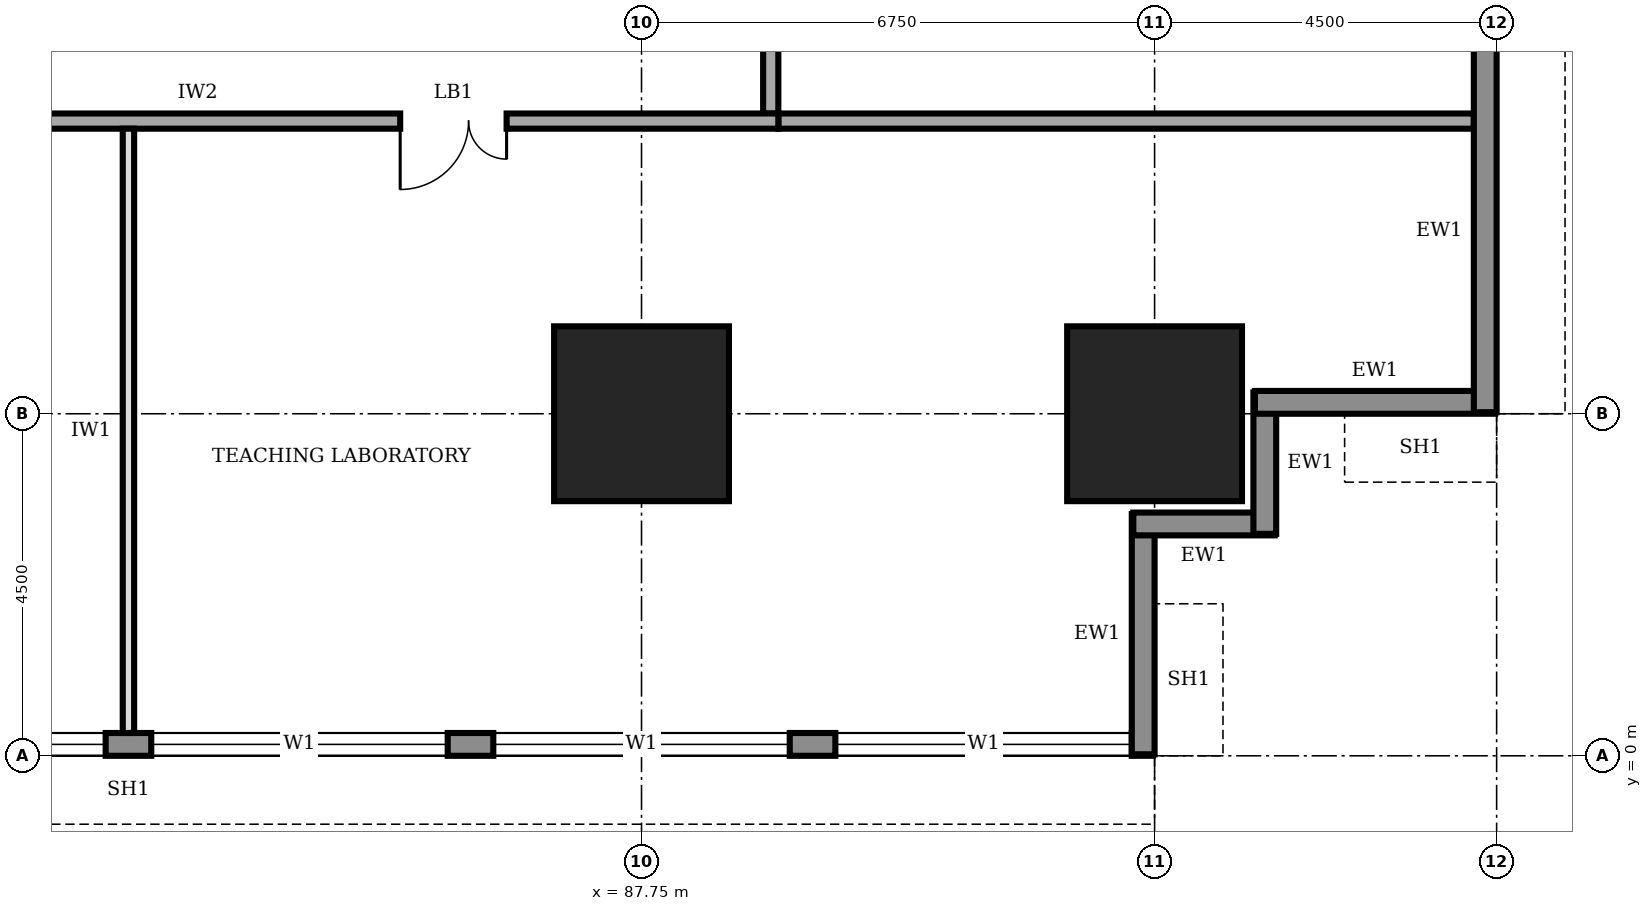
"""IFC4 building model, lengths in metres.
Left out: names, types, materials, properties, quantities, classifications, styles, units other than length and angle.
Written with IfcOpenShell. Run it as: python <this file> out.ifc"""

import sys

from ifc_helpers import new_model, si_unit, direction, frame, frame_2d, origin, origin_2d, place, context, subcontext, project, spatial, rectangle, extrude, element, fill, save


model = new_model("IFC4")
c1 = context("Model", 3, precision=1e-05, world=origin(), true_north=direction((0.0, 1.0)))
c2 = subcontext(c1, "Body", "Model", "MODEL_VIEW")
j1 = project(units=[si_unit("LENGTHUNIT", "METRE"), si_unit("PLANEANGLEUNIT", "RADIAN")], contexts=[c1])
p1 = place(None, origin())
s1 = spatial("IfcSite", under=j1, at=p1, CompositionType="ELEMENT")
p2 = place(p1, origin())
s2 = spatial("IfcBuilding", under=s1, at=p2, CompositionType="ELEMENT")
p3 = place(p2, frame((0.0, 0.0, 41.0)))
s3 = spatial("IfcBuildingStorey", under=s2, at=p3, CompositionType="ELEMENT", Elevation=41.0)
for number, where, z_axis, x_axis in (
    (1, (87.75, 4.5, 0.0), (0.0, 0.0, 1.0), (1.0, 0.0, 0.0)),
    (2, (94.5, 4.5, 0.0), (0.0, 0.0, 1.0), (1.0, 0.0, 0.0)),
):
    element("IfcColumn", number, at=place(p3, frame(where, z_axis=z_axis, x_axis=x_axis)), inside=s3, PredefinedType="COLUMN", context=c2, shape_type="SweptSolid", body=[
        extrude(rectangle(XDim=2.3, YDim=2.3, at=origin_2d()), origin(), (0.0, 0.0, 1.0), 4.0),
    ])
p4 = place(p3, frame((67.52, 0.15, 0.0), z_axis=(0.0, 0.0, 1.0), x_axis=(1.0, 0.0, 0.0)))
e3 = element("IfcWall", 3, at=p4, inside=s3, PredefinedType="STANDARD", context=c2, shape_type="SweptSolid", body=[
    extrude(rectangle(XDim=26.96, YDim=0.3, at=frame_2d((13.48, 0.0))), origin(), (0.0, 0.0, 1.0), 3.75),
])
p5 = place(p4, frame((4.78, 0.0, 0.9)))
e4 = element("IfcOpeningElement", 4, at=p5, cuts=e3, PredefinedType="OPENING", context=c2, shape_type="SweptSolid", body=[
    extrude(rectangle(XDim=3.9, YDim=2.2, at=frame_2d((1.95, 1.1))), frame((0.0, 0.16, 0.0), z_axis=(0.0, -1.0, 0.0), x_axis=(1.0, 0.0, 0.0)), (0.0, 0.0, 1.0), 0.32),
])
p6 = place(p4, frame((9.28, 0.0, 0.9)))
e5 = element("IfcOpeningElement", 5, at=p6, cuts=e3, PredefinedType="OPENING", context=c2, shape_type="SweptSolid", body=[
    extrude(rectangle(XDim=3.9, YDim=2.2, at=frame_2d((1.95, 1.1))), frame((0.0, 0.16, 0.0), z_axis=(0.0, -1.0, 0.0), x_axis=(1.0, 0.0, 0.0)), (0.0, 0.0, 1.0), 0.32),
])
p7 = place(p4, frame((13.78, 0.0, 0.9)))
e6 = element("IfcOpeningElement", 6, at=p7, cuts=e3, PredefinedType="OPENING", context=c2, shape_type="SweptSolid", body=[
    extrude(rectangle(XDim=3.9, YDim=2.2, at=frame_2d((1.95, 1.1))), frame((0.0, 0.16, 0.0), z_axis=(0.0, -1.0, 0.0), x_axis=(1.0, 0.0, 0.0)), (0.0, 0.0, 1.0), 0.32),
])
p8 = place(p4, frame((18.28, 0.0, 0.9)))
e7 = element("IfcOpeningElement", 7, at=p8, cuts=e3, PredefinedType="OPENING", context=c2, shape_type="SweptSolid", body=[
    extrude(rectangle(XDim=3.9, YDim=2.2, at=frame_2d((1.95, 1.1))), frame((0.0, 0.16, 0.0), z_axis=(0.0, -1.0, 0.0), x_axis=(1.0, 0.0, 0.0)), (0.0, 0.0, 1.0), 0.32),
])
p9 = place(p4, frame((22.78, 0.0, 0.9)))
e8 = element("IfcOpeningElement", 8, at=p9, cuts=e3, PredefinedType="OPENING", context=c2, shape_type="SweptSolid", body=[
    extrude(rectangle(XDim=3.9, YDim=2.2, at=frame_2d((1.95, 1.1))), frame((0.0, 0.16, 0.0), z_axis=(0.0, -1.0, 0.0), x_axis=(1.0, 0.0, 0.0)), (0.0, 0.0, 1.0), 0.32),
])
p10 = place(p3, frame((94.35, 0.02, 0.0), z_axis=(0.0, 0.0, 1.0), x_axis=(0.0, 1.0, 0.0)))
e9 = element("IfcWall", 9, at=p10, inside=s3, PredefinedType="STANDARD", context=c2, shape_type="SweptSolid", body=[
    extrude(rectangle(XDim=3.16, YDim=0.3, at=frame_2d((1.58, 0.0))), origin(), (0.0, 0.0, 1.0), 2.85),
])
for number, where, z_axis, x_axis in (
    (10, (94.22, 3.05, 0.0), (0.0, 0.0, 1.0), (1.0, 0.0, 0.0)),
    (11, (95.95, 2.92, 0.0), (0.0, 0.0, 1.0), (0.0, 1.0, 0.0)),
):
    element("IfcWall", number, at=place(p3, frame(where, z_axis=z_axis, x_axis=x_axis)), inside=s3, PredefinedType="STANDARD", context=c2, shape_type="SweptSolid", body=[
        extrude(rectangle(XDim=1.86, YDim=0.3, at=frame_2d((0.93, 0.0))), origin(), (0.0, 0.0, 1.0), 3.75),
    ])
p11 = place(p3, frame((95.82, 4.65, 0.0), z_axis=(0.0, 0.0, 1.0), x_axis=(1.0, 0.0, 0.0)))
e12 = element("IfcWall", 12, at=p11, inside=s3, PredefinedType="STANDARD", context=c2, shape_type="SweptSolid", body=[
    extrude(rectangle(XDim=3.16, YDim=0.3, at=frame_2d((1.58, 0.0))), origin(), (0.0, 0.0, 1.0), 2.85),
])
p12 = place(p3, frame((98.85, 4.52, 0.0), z_axis=(0.0, 0.0, 1.0), x_axis=(0.0, 1.0, 0.0)))
e13 = element("IfcWall", 13, at=p12, inside=s3, PredefinedType="STANDARD", context=c2, shape_type="SweptSolid", body=[
    extrude(rectangle(XDim=31.46, YDim=0.3, at=frame_2d((15.73, 0.0))), origin(), (0.0, 0.0, 1.0), 3.75),
])
p13 = place(p12, frame((4.78, 0.0, 0.9)))
e14 = element("IfcOpeningElement", 14, at=p13, cuts=e13, PredefinedType="OPENING", context=c2, shape_type="SweptSolid", body=[
    extrude(rectangle(XDim=3.9, YDim=2.2, at=frame_2d((1.95, 1.1))), frame((0.0, 0.16, 0.0), z_axis=(0.0, -1.0, 0.0), x_axis=(1.0, 0.0, 0.0)), (0.0, 0.0, 1.0), 0.32),
])
p14 = place(p12, frame((9.28, 0.0, 0.9)))
e15 = element("IfcOpeningElement", 15, at=p14, cuts=e13, PredefinedType="OPENING", context=c2, shape_type="SweptSolid", body=[
    extrude(rectangle(XDim=3.9, YDim=2.2, at=frame_2d((1.95, 1.1))), frame((0.0, 0.16, 0.0), z_axis=(0.0, -1.0, 0.0), x_axis=(1.0, 0.0, 0.0)), (0.0, 0.0, 1.0), 0.32),
])
p15 = place(p12, frame((13.78, 0.0, 0.9)))
e16 = element("IfcOpeningElement", 16, at=p15, cuts=e13, PredefinedType="OPENING", context=c2, shape_type="SweptSolid", body=[
    extrude(rectangle(XDim=3.9, YDim=2.2, at=frame_2d((1.95, 1.1))), frame((0.0, 0.16, 0.0), z_axis=(0.0, -1.0, 0.0), x_axis=(1.0, 0.0, 0.0)), (0.0, 0.0, 1.0), 0.32),
])
p16 = place(p12, frame((18.28, 0.0, 0.9)))
e17 = element("IfcOpeningElement", 17, at=p16, cuts=e13, PredefinedType="OPENING", context=c2, shape_type="SweptSolid", body=[
    extrude(rectangle(XDim=3.9, YDim=2.2, at=frame_2d((1.95, 1.1))), frame((0.0, 0.16, 0.0), z_axis=(0.0, -1.0, 0.0), x_axis=(1.0, 0.0, 0.0)), (0.0, 0.0, 1.0), 0.32),
])
p17 = place(p12, frame((22.78, 0.0, 0.9)))
e18 = element("IfcOpeningElement", 18, at=p17, cuts=e13, PredefinedType="OPENING", context=c2, shape_type="SweptSolid", body=[
    extrude(rectangle(XDim=3.9, YDim=2.2, at=frame_2d((1.95, 1.1))), frame((0.0, 0.16, 0.0), z_axis=(0.0, -1.0, 0.0), x_axis=(1.0, 0.0, 0.0)), (0.0, 0.0, 1.0), 0.32),
])
p18 = place(p12, frame((27.28, 0.0, 0.9)))
e19 = element("IfcOpeningElement", 19, at=p18, cuts=e13, PredefinedType="OPENING", context=c2, shape_type="SweptSolid", body=[
    extrude(rectangle(XDim=3.9, YDim=2.2, at=frame_2d((1.95, 1.1))), frame((0.0, 0.16, 0.0), z_axis=(0.0, -1.0, 0.0), x_axis=(1.0, 0.0, 0.0)), (0.0, 0.0, 1.0), 0.32),
])
p19 = place(p3, frame((72.65, 8.35, 0.0), z_axis=(0.0, 0.0, 1.0), x_axis=(1.0, 0.0, 0.0)))
e20 = element("IfcWall", 20, at=p19, inside=s3, PredefinedType="SOLIDWALL", context=c2, shape_type="SweptSolid", body=[
    extrude(rectangle(XDim=16.9, YDim=0.2, at=frame_2d((8.45, 0.0))), origin(), (0.0, 0.0, 1.0), 3.75),
])
p20 = place(p19, frame((1.325, 0.0, 0.0)))
e21 = element("IfcOpeningElement", 21, at=p20, cuts=e20, PredefinedType="OPENING", context=c2, shape_type="SweptSolid", body=[
    extrude(rectangle(XDim=1.0, YDim=2.1, at=frame_2d((0.5, 1.05))), frame((0.0, 0.11, 0.0), z_axis=(0.0, -1.0, 0.0), x_axis=(1.0, 0.0, 0.0)), (0.0, 0.0, 1.0), 0.22),
])
p21 = place(p19, frame((5.6, 0.0, 0.0)))
e22 = element("IfcOpeningElement", 22, at=p21, cuts=e20, PredefinedType="OPENING", context=c2, shape_type="SweptSolid", body=[
    extrude(rectangle(XDim=1.0, YDim=2.1, at=frame_2d((0.5, 1.05))), frame((0.0, 0.11, 0.0), z_axis=(0.0, -1.0, 0.0), x_axis=(1.0, 0.0, 0.0)), (0.0, 0.0, 1.0), 0.22),
])
p22 = place(p19, frame((11.925, 0.0, 0.0)))
e23 = element("IfcOpeningElement", 23, at=p22, cuts=e20, PredefinedType="OPENING", context=c2, shape_type="SweptSolid", body=[
    extrude(rectangle(XDim=1.4, YDim=2.1, at=frame_2d((0.7, 1.05))), frame((0.0, 0.11, 0.0), z_axis=(0.0, -1.0, 0.0), x_axis=(1.0, 0.0, 0.0)), (0.0, 0.0, 1.0), 0.22),
])
p23 = place(p3, frame((89.45, 8.45, 0.0), z_axis=(0.0, 0.0, 1.0), x_axis=(0.0, 1.0, 0.0)))
e24 = element("IfcWall", 24, at=p23, inside=s3, PredefinedType="SOLIDWALL", context=c2, shape_type="SweptSolid", body=[
    extrude(rectangle(XDim=23.8, YDim=0.2, at=frame_2d((11.9, 0.0))), origin(), (0.0, 0.0, 1.0), 3.75),
])
p24 = place(p23, frame((1.925, 0.0, 0.0)))
e25 = element("IfcOpeningElement", 25, at=p24, cuts=e24, PredefinedType="OPENING", context=c2, shape_type="SweptSolid", body=[
    extrude(rectangle(XDim=1.0, YDim=2.1, at=frame_2d((0.5, 1.05))), frame((0.0, 0.11, 0.0), z_axis=(0.0, -1.0, 0.0), x_axis=(1.0, 0.0, 0.0)), (0.0, 0.0, 1.0), 0.22),
])
p25 = place(p23, frame((6.3, 0.0, 0.0)))
e26 = element("IfcOpeningElement", 26, at=p25, cuts=e24, PredefinedType="OPENING", context=c2, shape_type="SweptSolid", body=[
    extrude(rectangle(XDim=0.9, YDim=2.1, at=frame_2d((0.45, 1.05))), frame((0.0, 0.11, 0.0), z_axis=(0.0, -1.0, 0.0), x_axis=(1.0, 0.0, 0.0)), (0.0, 0.0, 1.0), 0.22),
])
p26 = place(p23, frame((11.1, 0.0, 0.0)))
e27 = element("IfcOpeningElement", 27, at=p26, cuts=e24, PredefinedType="OPENING", context=c2, shape_type="SweptSolid", body=[
    extrude(rectangle(XDim=0.9, YDim=2.1, at=frame_2d((0.45, 1.05))), frame((0.0, 0.11, 0.0), z_axis=(0.0, -1.0, 0.0), x_axis=(1.0, 0.0, 0.0)), (0.0, 0.0, 1.0), 0.22),
])
p27 = place(p23, frame((14.15, 0.0, 0.0)))
e28 = element("IfcOpeningElement", 28, at=p27, cuts=e24, PredefinedType="OPENING", context=c2, shape_type="SweptSolid", body=[
    extrude(rectangle(XDim=0.9, YDim=2.1, at=frame_2d((0.45, 1.05))), frame((0.0, 0.11, 0.0), z_axis=(0.0, -1.0, 0.0), x_axis=(1.0, 0.0, 0.0)), (0.0, 0.0, 1.0), 0.22),
])
p28 = place(p23, frame((17.05, 0.0, 0.0)))
e29 = element("IfcOpeningElement", 29, at=p28, cuts=e24, PredefinedType="OPENING", context=c2, shape_type="SweptSolid", body=[
    extrude(rectangle(XDim=1.0, YDim=2.1, at=frame_2d((0.5, 1.05))), frame((0.0, 0.11, 0.0), z_axis=(0.0, -1.0, 0.0), x_axis=(1.0, 0.0, 0.0)), (0.0, 0.0, 1.0), 0.22),
])
p29 = place(p23, frame((8.95, 0.0, 0.0)))
e30 = element("IfcOpeningElement", 30, at=p29, cuts=e24, PredefinedType="OPENING", context=c2, shape_type="SweptSolid", body=[
    extrude(rectangle(XDim=1.0, YDim=2.1, at=frame_2d((0.5, 1.05))), frame((0.0, 0.11, 0.0), z_axis=(0.0, -1.0, 0.0), x_axis=(1.0, 0.0, 0.0)), (0.0, 0.0, 1.0), 0.22),
])
p30 = place(p23, frame((20.675, 0.0, 0.0)))
e31 = element("IfcOpeningElement", 31, at=p30, cuts=e24, PredefinedType="OPENING", context=c2, shape_type="SweptSolid", body=[
    extrude(rectangle(XDim=1.0, YDim=2.1, at=frame_2d((0.5, 1.05))), frame((0.0, 0.11, 0.0), z_axis=(0.0, -1.0, 0.0), x_axis=(1.0, 0.0, 0.0)), (0.0, 0.0, 1.0), 0.22),
])
p31 = place(p3, frame((89.55, 8.35, 0.0), z_axis=(0.0, 0.0, 1.0), x_axis=(1.0, 0.0, 0.0)))
e32 = element("IfcWall", 32, at=p31, inside=s3, PredefinedType="SOLIDWALL", context=c2, shape_type="SweptSolid", body=[
    extrude(rectangle(XDim=9.15, YDim=0.2, at=frame_2d((4.575, 0.0))), origin(), (0.0, 0.0, 1.0), 3.75),
])
p32 = place(p3, frame((81.0, 0.3, 0.0), z_axis=(0.0, 0.0, 1.0), x_axis=(0.0, 1.0, 0.0)))
e33 = element("IfcWall", 33, at=p32, inside=s3, PredefinedType="PARTITIONING", context=c2, shape_type="SweptSolid", body=[
    extrude(rectangle(XDim=7.95, YDim=0.15, at=frame_2d((3.975, 0.0))), origin(), (0.0, 0.0, 1.0), 3.75),
])
p33 = place(p6, origin())
e34 = element("IfcWindow", 34, at=p33, inside=s3, PartitioningType="SINGLE_PANEL", PredefinedType="WINDOW", context=c2, shape_type="SweptSolid", body=[
    extrude(rectangle(XDim=3.9, YDim=2.2, at=frame_2d((1.95, 1.1))), frame((0.0, 0.03, 0.0), z_axis=(0.0, -1.0, 0.0), x_axis=(1.0, 0.0, 0.0)), (0.0, 0.0, 1.0), 0.06),
])
fill(e5, e34)
p34 = place(p7, origin())
e35 = element("IfcWindow", 35, at=p34, inside=s3, PartitioningType="SINGLE_PANEL", PredefinedType="WINDOW", context=c2, shape_type="SweptSolid", body=[
    extrude(rectangle(XDim=3.9, YDim=2.2, at=frame_2d((1.95, 1.1))), frame((0.0, 0.03, 0.0), z_axis=(0.0, -1.0, 0.0), x_axis=(1.0, 0.0, 0.0)), (0.0, 0.0, 1.0), 0.06),
])
fill(e6, e35)
p35 = place(p8, origin())
e36 = element("IfcWindow", 36, at=p35, inside=s3, PartitioningType="SINGLE_PANEL", PredefinedType="WINDOW", context=c2, shape_type="SweptSolid", body=[
    extrude(rectangle(XDim=3.9, YDim=2.2, at=frame_2d((1.95, 1.1))), frame((0.0, 0.03, 0.0), z_axis=(0.0, -1.0, 0.0), x_axis=(1.0, 0.0, 0.0)), (0.0, 0.0, 1.0), 0.06),
])
fill(e7, e36)
p36 = place(p9, origin())
e37 = element("IfcWindow", 37, at=p36, inside=s3, PartitioningType="SINGLE_PANEL", PredefinedType="WINDOW", context=c2, shape_type="SweptSolid", body=[
    extrude(rectangle(XDim=3.9, YDim=2.2, at=frame_2d((1.95, 1.1))), frame((0.0, 0.03, 0.0), z_axis=(0.0, -1.0, 0.0), x_axis=(1.0, 0.0, 0.0)), (0.0, 0.0, 1.0), 0.06),
])
fill(e8, e37)
p37 = place(p22, frame((1.4, 0.0, 0.0), z_axis=(0.0, 0.0, 1.0), x_axis=(-1.0, 0.0, 0.0)))
e38 = element("IfcDoor", 38, at=p37, inside=s3, OperationType="DOUBLE_DOOR_SINGLE_SWING", PredefinedType="DOOR", context=c2, shape_type="SweptSolid", body=[
    extrude(rectangle(XDim=1.4, YDim=2.1, at=frame_2d((0.7, 1.05))), frame((0.0, 0.025, 0.0), z_axis=(0.0, -1.0, 0.0), x_axis=(1.0, 0.0, 0.0)), (0.0, 0.0, 1.0), 0.05),
])
fill(e23, e38)
save(model, sys.argv[1])
